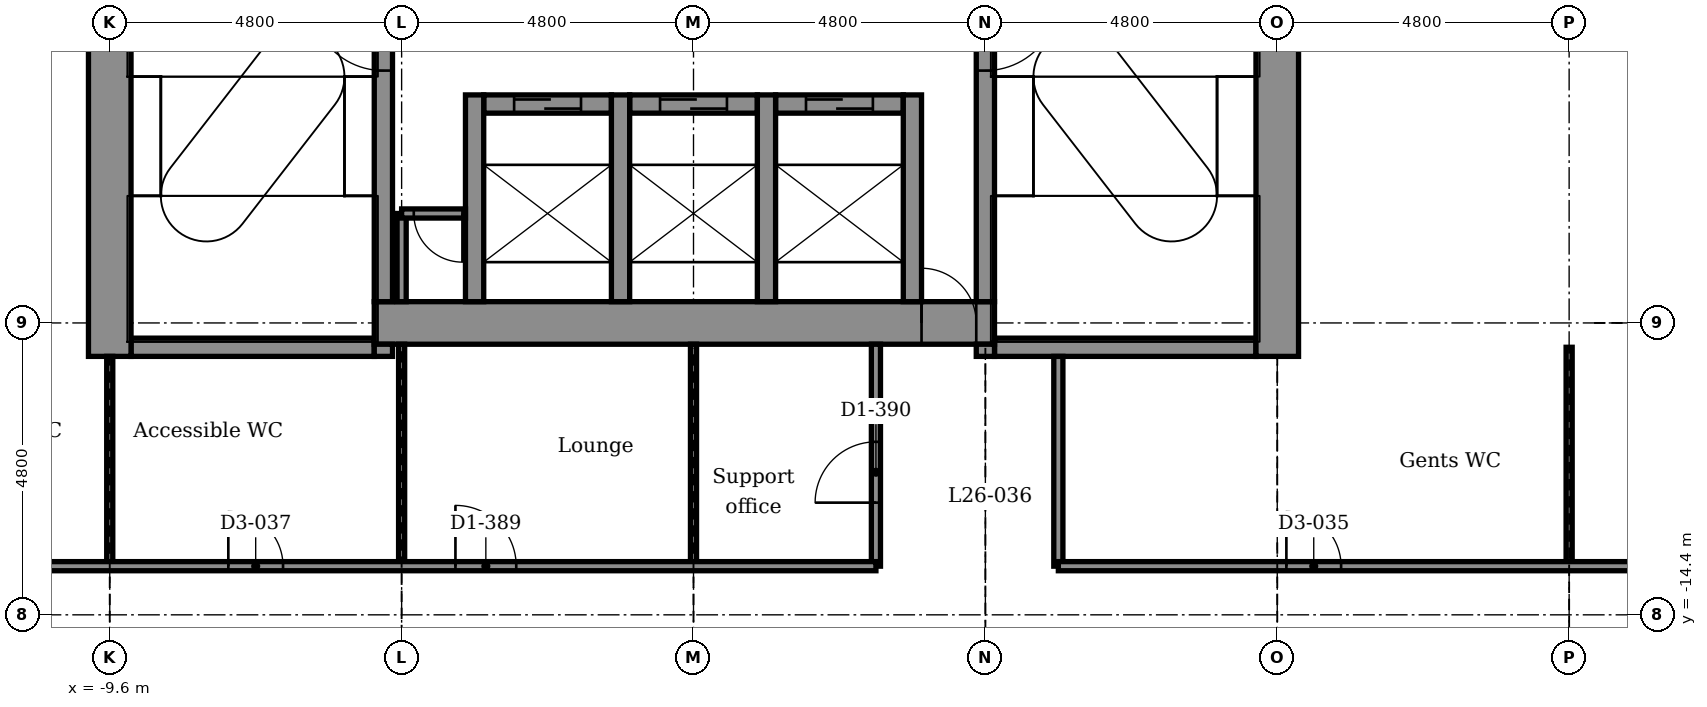
"""IFC4 building model, lengths in metres.
Left out: names, types, materials, properties, quantities, classifications, styles, units other than length and angle.
Written with IfcOpenShell. Run it as: python <this file> out.ifc"""

import sys

from ifc_helpers import new_model, si_unit, direction, frame, frame_2d, origin, place, context, subcontext, project, spatial, rectangle, extrude, element, fill, save


model = new_model("IFC4")
c1 = context("Model", 3, precision=1e-05, world=origin(), true_north=direction((0.0, 1.0)))
c2 = subcontext(c1, "Body", "Model", "MODEL_VIEW")
j1 = project(units=[si_unit("LENGTHUNIT", "METRE"), si_unit("PLANEANGLEUNIT", "RADIAN")], contexts=[c1])
p1 = place(None, origin())
s1 = spatial("IfcSite", under=j1, at=p1, CompositionType="ELEMENT")
p2 = place(p1, origin())
s2 = spatial("IfcBuilding", under=s1, at=p2, CompositionType="ELEMENT")
p3 = place(p2, frame((0.0, 0.0, 133.4)))
s3 = spatial("IfcBuildingStorey", under=s2, at=p3, CompositionType="ELEMENT", Elevation=133.4)
p4 = place(p3, frame((-9.25, -10.0, -0.15), z_axis=(0.0, 0.0, 1.0), x_axis=(1.0, 0.0, 0.0)))
e1 = element("IfcWall", 1, at=p4, inside=s3, PredefinedType="STANDARD", context=c2, shape_type="SweptSolid", body=[
    extrude(rectangle(XDim=4.0, YDim=0.3, at=frame_2d((2.0, 0.0))), origin(), (0.0, 0.0, 1.0), 5.4),
])
p5 = place(p3, frame((4.95, -10.0, -0.15), z_axis=(0.0, 0.0, 1.0), x_axis=(1.0, 0.0, 0.0)))
e2 = element("IfcWall", 2, at=p5, inside=s3, PredefinedType="STANDARD", context=c2, shape_type="SweptSolid", body=[
    extrude(rectangle(XDim=4.3, YDim=0.3, at=frame_2d((2.15, 0.0))), origin(), (0.0, 0.0, 1.0), 5.4),
])
p6 = place(p3, frame((-5.25, -9.6, -0.15), z_axis=(0.0, 0.0, 1.0), x_axis=(1.0, 0.0, 0.0)))
e3 = element("IfcWall", 3, at=p6, inside=s3, PredefinedType="SHEAR", context=c2, shape_type="SweptSolid", body=[
    extrude(rectangle(XDim=10.2, YDim=0.7, at=frame_2d((5.1, 0.0))), origin(), (0.0, 0.0, 1.0), 5.4),
])
p7 = place(p6, frame((9.0, 0.0, 0.15)))
e4 = element("IfcOpeningElement", 4, at=p7, cuts=e3, PredefinedType="OPENING", context=c2, shape_type="SweptSolid", body=[
    extrude(rectangle(XDim=0.9, YDim=2.1, at=frame_2d((0.45, 1.05))), frame((0.0, 0.36, 0.0), z_axis=(0.0, -1.0, 0.0), x_axis=(1.0, 0.0, 0.0)), (0.0, 0.0, 1.0), 0.72),
])
p8 = place(p3, frame((-3.45, -6.0, -0.15), z_axis=(0.0, 0.0, 1.0), x_axis=(1.0, 0.0, 0.0)))
e5 = element("IfcWall", 5, at=p8, inside=s3, PredefinedType="STANDARD", context=c2, shape_type="SweptSolid", body=[
    extrude(rectangle(XDim=2.1, YDim=0.3, at=frame_2d((1.05, 0.0))), origin(), (0.0, 0.0, 1.0), 5.4),
])
p9 = place(p8, frame((0.5, 0.0, 0.15)))
e6 = element("IfcOpeningElement", 6, at=p9, cuts=e5, PredefinedType="OPENING", context=c2, shape_type="SweptSolid", body=[
    extrude(rectangle(XDim=1.1, YDim=2.1, at=frame_2d((0.55, 1.05))), frame((0.0, 0.16, 0.0), z_axis=(0.0, -1.0, 0.0), x_axis=(1.0, 0.0, 0.0)), (0.0, 0.0, 1.0), 0.32),
])
p10 = place(p3, frame((-1.05, -6.0, -0.15), z_axis=(0.0, 0.0, 1.0), x_axis=(1.0, 0.0, 0.0)))
e7 = element("IfcWall", 7, at=p10, inside=s3, PredefinedType="STANDARD", context=c2, shape_type="SweptSolid", body=[
    extrude(rectangle(XDim=2.1, YDim=0.3, at=frame_2d((1.05, 0.0))), origin(), (0.0, 0.0, 1.0), 5.4),
])
p11 = place(p10, frame((0.5, 0.0, 0.15)))
e8 = element("IfcOpeningElement", 8, at=p11, cuts=e7, PredefinedType="OPENING", context=c2, shape_type="SweptSolid", body=[
    extrude(rectangle(XDim=1.1, YDim=2.1, at=frame_2d((0.55, 1.05))), frame((0.0, 0.16, 0.0), z_axis=(0.0, -1.0, 0.0), x_axis=(1.0, 0.0, 0.0)), (0.0, 0.0, 1.0), 0.32),
])
p12 = place(p3, frame((1.35, -6.0, -0.15), z_axis=(0.0, 0.0, 1.0), x_axis=(1.0, 0.0, 0.0)))
e9 = element("IfcWall", 9, at=p12, inside=s3, PredefinedType="STANDARD", context=c2, shape_type="SweptSolid", body=[
    extrude(rectangle(XDim=2.1, YDim=0.3, at=frame_2d((1.05, 0.0))), origin(), (0.0, 0.0, 1.0), 5.4),
])
p13 = place(p12, frame((0.5, 0.0, 0.15)))
e10 = element("IfcOpeningElement", 10, at=p13, cuts=e9, PredefinedType="OPENING", context=c2, shape_type="SweptSolid", body=[
    extrude(rectangle(XDim=1.1, YDim=2.1, at=frame_2d((0.55, 1.05))), frame((0.0, 0.16, 0.0), z_axis=(0.0, -1.0, 0.0), x_axis=(1.0, 0.0, 0.0)), (0.0, 0.0, 1.0), 0.32),
])
p14 = place(p3, frame((-9.6, -10.15, -0.15), z_axis=(0.0, 0.0, 1.0), x_axis=(0.0, 1.0, 0.0)))
e11 = element("IfcWall", 11, at=p14, inside=s3, PredefinedType="SHEAR", context=c2, shape_type="SweptSolid", body=[
    extrude(rectangle(XDim=7.6, YDim=0.7, at=frame_2d((3.8, 0.0))), origin(), (0.0, 0.0, 1.0), 5.4),
])
p15 = place(p3, frame((-5.1, -10.15, -0.15), z_axis=(0.0, 0.0, 1.0), x_axis=(0.0, 1.0, 0.0)))
e12 = element("IfcWall", 12, at=p15, inside=s3, PredefinedType="STANDARD", context=c2, shape_type="SweptSolid", body=[
    extrude(rectangle(XDim=0.2, YDim=0.3, at=frame_2d((0.1, 0.0))), origin(), (0.0, 0.0, 1.0), 5.4),
])
p16 = place(p3, frame((-5.1, -9.25, -0.15), z_axis=(0.0, 0.0, 1.0), x_axis=(0.0, 1.0, 0.0)))
e13 = element("IfcWall", 13, at=p16, inside=s3, PredefinedType="STANDARD", context=c2, shape_type="SweptSolid", body=[
    extrude(rectangle(XDim=7.0, YDim=0.3, at=frame_2d((3.5, 0.0))), origin(), (0.0, 0.0, 1.0), 5.4),
])
p17 = place(p16, frame((3.8, 0.0, 0.15)))
e14 = element("IfcOpeningElement", 14, at=p17, cuts=e13, PredefinedType="OPENING", context=c2, shape_type="SweptSolid", body=[
    extrude(rectangle(XDim=1.2, YDim=2.1, at=frame_2d((0.6, 1.05))), frame((0.0, 0.16, 0.0), z_axis=(0.0, -1.0, 0.0), x_axis=(1.0, 0.0, 0.0)), (0.0, 0.0, 1.0), 0.32),
])
for number, where, z_axis, x_axis in (
    (15, (-3.6, -9.25, -0.15), (0.0, 0.0, 1.0), (0.0, 1.0, 0.0)),
    (16, (-1.2, -9.25, -0.15), (0.0, 0.0, 1.0), (0.0, 1.0, 0.0)),
    (17, (1.2, -9.25, -0.15), (0.0, 0.0, 1.0), (0.0, 1.0, 0.0)),
    (18, (3.6, -9.25, -0.15), (0.0, 0.0, 1.0), (0.0, 1.0, 0.0)),
):
    element("IfcWall", number, at=place(p3, frame(where, z_axis=z_axis, x_axis=x_axis)), inside=s3, PredefinedType="STANDARD", context=c2, shape_type="SweptSolid", body=[
        extrude(rectangle(XDim=3.4, YDim=0.3, at=frame_2d((1.7, 0.0))), origin(), (0.0, 0.0, 1.0), 5.4),
    ])
p18 = place(p3, frame((4.8, -10.15, -0.15), z_axis=(0.0, 0.0, 1.0), x_axis=(0.0, 1.0, 0.0)))
e19 = element("IfcWall", 19, at=p18, inside=s3, PredefinedType="STANDARD", context=c2, shape_type="SweptSolid", body=[
    extrude(rectangle(XDim=0.2, YDim=0.3, at=frame_2d((0.1, 0.0))), origin(), (0.0, 0.0, 1.0), 5.4),
])
p19 = place(p3, frame((4.8, -9.25, -0.15), z_axis=(0.0, 0.0, 1.0), x_axis=(0.0, 1.0, 0.0)))
e20 = element("IfcWall", 20, at=p19, inside=s3, PredefinedType="STANDARD", context=c2, shape_type="SweptSolid", body=[
    extrude(rectangle(XDim=7.0, YDim=0.3, at=frame_2d((3.5, 0.0))), origin(), (0.0, 0.0, 1.0), 5.4),
])
p20 = place(p19, frame((3.8, 0.0, 0.15)))
e21 = element("IfcOpeningElement", 21, at=p20, cuts=e20, PredefinedType="OPENING", context=c2, shape_type="SweptSolid", body=[
    extrude(rectangle(XDim=1.2, YDim=2.1, at=frame_2d((0.6, 1.05))), frame((0.0, 0.16, 0.0), z_axis=(0.0, -1.0, 0.0), x_axis=(1.0, 0.0, 0.0)), (0.0, 0.0, 1.0), 0.32),
])
p21 = place(p3, frame((9.6, -10.15, -0.15), z_axis=(0.0, 0.0, 1.0), x_axis=(0.0, 1.0, 0.0)))
e22 = element("IfcWall", 22, at=p21, inside=s3, PredefinedType="SHEAR", context=c2, shape_type="SweptSolid", body=[
    extrude(rectangle(XDim=20.1, YDim=0.7, at=frame_2d((10.05, 0.0))), origin(), (0.0, 0.0, 1.0), 5.4),
])
p22 = place(p3, frame((14.4, -13.6, 0.0), z_axis=(0.0, 0.0, 1.0), x_axis=(0.0, 1.0, 0.0)))
e23 = element("IfcWall", 23, at=p22, inside=s3, PredefinedType="PARTITIONING", context=c2, shape_type="SweptSolid", body=[
    extrude(rectangle(XDim=3.6, YDim=0.1, at=frame_2d((1.8, 0.0))), origin(), (0.0, 0.0, 1.0), 4.566),
])
p23 = place(p3, frame((6.0, -13.6, 0.0), z_axis=(0.0, 0.0, 1.0), x_axis=(0.0, 1.0, 0.0)))
e24 = element("IfcWall", 24, at=p23, inside=s3, PredefinedType="PARTITIONING", context=c2, shape_type="SweptSolid", body=[
    extrude(rectangle(XDim=3.45, YDim=0.15, at=frame_2d((1.725, 0.0))), origin(), (0.0, 0.0, 1.0), 5.25),
])
p24 = place(p3, frame((3.0, -13.6, 0.0), z_axis=(0.0, 0.0, 1.0), x_axis=(0.0, 1.0, 0.0)))
e25 = element("IfcWall", 25, at=p24, inside=s3, PredefinedType="PARTITIONING", context=c2, shape_type="SweptSolid", body=[
    extrude(rectangle(XDim=3.65, YDim=0.15, at=frame_2d((1.825, 0.0))), origin(), (0.0, 0.0, 1.0), 5.25),
])
p25 = place(p24, frame((1.045, 0.0, 0.0)))
e26 = element("IfcOpeningElement", 26, at=p25, cuts=e25, PredefinedType="OPENING", context=c2, shape_type="SweptSolid", body=[
    extrude(rectangle(XDim=1.0, YDim=2.1, at=frame_2d((0.5, 1.05))), frame((0.0, 0.085, 0.0), z_axis=(0.0, -1.0, 0.0), x_axis=(1.0, 0.0, 0.0)), (0.0, 0.0, 1.0), 0.17),
])
for number, where, z_axis, x_axis in (
    (27, (0.0, -13.6, 0.0), (0.0, 0.0, 1.0), (0.0, 1.0, 0.0)),
    (28, (-4.8, -13.6, 0.0), (0.0, 0.0, 1.0), (0.0, 1.0, 0.0)),
):
    element("IfcWall", number, at=place(p3, frame(where, z_axis=z_axis, x_axis=x_axis)), inside=s3, PredefinedType="PARTITIONING", context=c2, shape_type="SweptSolid", body=[
        extrude(rectangle(XDim=3.65, YDim=0.1, at=frame_2d((1.825, 0.0))), origin(), (0.0, 0.0, 1.0), 4.566),
    ])
p26 = place(p3, frame((-4.8, -9.25, 0.0), z_axis=(0.0, 0.0, 1.0), x_axis=(0.0, 1.0, 0.0)))
e29 = element("IfcWall", 29, at=p26, inside=s3, PredefinedType="PARTITIONING", context=c2, shape_type="SweptSolid", body=[
    extrude(rectangle(XDim=1.45, YDim=0.15, at=frame_2d((0.725, 0.0))), origin(), (0.0, 0.0, 1.0), 5.25),
])
p27 = place(p3, frame((-9.6, -13.6, 0.0), z_axis=(0.0, 0.0, 1.0), x_axis=(0.0, 1.0, 0.0)))
e30 = element("IfcWall", 30, at=p27, inside=s3, PredefinedType="PARTITIONING", context=c2, shape_type="SweptSolid", body=[
    extrude(rectangle(XDim=3.45, YDim=0.1, at=frame_2d((1.725, 0.0))), origin(), (0.0, 0.0, 1.0), 4.566),
])
p28 = place(p3, frame((-17.276, -13.6, 0.0), z_axis=(0.0, 0.0, 1.0), x_axis=(1.0, 0.0, 0.0)))
e31 = element("IfcWall", 31, at=p28, inside=s3, PredefinedType="PARTITIONING", context=c2, shape_type="SweptSolid", body=[
    extrude(rectangle(XDim=20.276, YDim=0.15, at=frame_2d((10.138, 0.0))), origin(), (0.0, 0.0, 1.0), 5.25),
])
p29 = place(p28, frame((4.826, 0.0, 0.0)))
e32 = element("IfcOpeningElement", 32, at=p29, cuts=e31, PredefinedType="OPENING", context=c2, shape_type="SweptSolid", body=[
    extrude(rectangle(XDim=0.9, YDim=2.1, at=frame_2d((0.45, 1.05))), frame((0.0, 0.085, 0.0), z_axis=(0.0, -1.0, 0.0), x_axis=(1.0, 0.0, 0.0)), (0.0, 0.0, 1.0), 0.17),
])
p30 = place(p28, frame((9.626, 0.0, 0.0)))
e33 = element("IfcOpeningElement", 33, at=p30, cuts=e31, PredefinedType="OPENING", context=c2, shape_type="SweptSolid", body=[
    extrude(rectangle(XDim=0.9, YDim=2.1, at=frame_2d((0.45, 1.05))), frame((0.0, 0.085, 0.0), z_axis=(0.0, -1.0, 0.0), x_axis=(1.0, 0.0, 0.0)), (0.0, 0.0, 1.0), 0.17),
])
p31 = place(p28, frame((13.361, 0.0, 0.0)))
e34 = element("IfcOpeningElement", 34, at=p31, cuts=e31, PredefinedType="OPENING", context=c2, shape_type="SweptSolid", body=[
    extrude(rectangle(XDim=1.0, YDim=2.1, at=frame_2d((0.5, 1.05))), frame((0.0, 0.085, 0.0), z_axis=(0.0, -1.0, 0.0), x_axis=(1.0, 0.0, 0.0)), (0.0, 0.0, 1.0), 0.17),
])
p32 = place(p3, frame((6.0, -13.6, 0.0), z_axis=(0.0, 0.0, 1.0), x_axis=(1.0, 0.0, 0.0)))
e35 = element("IfcWall", 35, at=p32, inside=s3, PredefinedType="PARTITIONING", context=c2, shape_type="SweptSolid", body=[
    extrude(rectangle(XDim=13.077, YDim=0.15, at=frame_2d((6.539, 0.0))), origin(), (0.0, 0.0, 1.0), 5.25),
])
p33 = place(p32, frame((3.75, 0.0, 0.0)))
e36 = element("IfcOpeningElement", 36, at=p33, cuts=e35, PredefinedType="OPENING", context=c2, shape_type="SweptSolid", body=[
    extrude(rectangle(XDim=0.9, YDim=2.1, at=frame_2d((0.45, 1.05))), frame((0.0, 0.085, 0.0), z_axis=(0.0, -1.0, 0.0), x_axis=(1.0, 0.0, 0.0)), (0.0, 0.0, 1.0), 0.17),
])
p34 = place(p3, frame((-4.8, -7.8, 0.0), z_axis=(0.0, 0.0, 1.0), x_axis=(1.0, 0.0, 0.0)))
e37 = element("IfcWall", 37, at=p34, inside=s3, PredefinedType="PARTITIONING", context=c2, shape_type="SweptSolid", body=[
    extrude(rectangle(XDim=1.05, YDim=0.15, at=frame_2d((0.525, 0.0))), origin(), (0.0, 0.0, 1.0), 5.25),
])
p35 = place(p34, frame((0.2, 0.0, 0.0)))
e38 = element("IfcOpeningElement", 38, at=p35, cuts=e37, PredefinedType="OPENING", context=c2, shape_type="SweptSolid", body=[
    extrude(rectangle(XDim=0.8, YDim=2.1, at=frame_2d((0.4, 1.05))), frame((0.0, 0.085, 0.0), z_axis=(0.0, -1.0, 0.0), x_axis=(1.0, 0.0, 0.0)), (0.0, 0.0, 1.0), 0.17),
])
p36 = place(p35, frame((0.8, 0.0, 0.0), z_axis=(0.0, 0.0, 1.0), x_axis=(-1.0, 0.0, 0.0)))
e39 = element("IfcDoor", 39, at=p36, inside=s3, OperationType="SINGLE_SWING_RIGHT", PredefinedType="DOOR", context=c2, shape_type="SweptSolid", body=[
    extrude(rectangle(XDim=0.8, YDim=2.1, at=frame_2d((0.4, 1.05))), frame((0.0, 0.025, 0.0), z_axis=(0.0, -1.0, 0.0), x_axis=(1.0, 0.0, 0.0)), (0.0, 0.0, 1.0), 0.05),
])
fill(e38, e39)
p37 = place(p33, origin())
e40 = element("IfcDoor", 40, at=p37, inside=s3, OperationType="SINGLE_SWING_LEFT", PredefinedType="DOOR", context=c2, shape_type="SweptSolid", body=[
    extrude(rectangle(XDim=0.9, YDim=2.1, at=frame_2d((0.45, 1.05))), frame((0.0, 0.025, 0.0), z_axis=(0.0, -1.0, 0.0), x_axis=(1.0, 0.0, 0.0)), (0.0, 0.0, 1.0), 0.05),
])
fill(e36, e40)
p38 = place(p30, origin())
e41 = element("IfcDoor", 41, at=p38, inside=s3, OperationType="SINGLE_SWING_LEFT", PredefinedType="DOOR", context=c2, shape_type="SweptSolid", body=[
    extrude(rectangle(XDim=0.9, YDim=2.1, at=frame_2d((0.45, 1.05))), frame((0.0, 0.025, 0.0), z_axis=(0.0, -1.0, 0.0), x_axis=(1.0, 0.0, 0.0)), (0.0, 0.0, 1.0), 0.05),
])
fill(e33, e41)
p39 = place(p31, origin())
e42 = element("IfcDoor", 42, at=p39, inside=s3, OperationType="SINGLE_SWING_LEFT", PredefinedType="DOOR", context=c2, shape_type="SweptSolid", body=[
    extrude(rectangle(XDim=1.0, YDim=2.1, at=frame_2d((0.5, 1.05))), frame((0.0, 0.025, 0.0), z_axis=(0.0, -1.0, 0.0), x_axis=(1.0, 0.0, 0.0)), (0.0, 0.0, 1.0), 0.05),
])
fill(e34, e42)
p40 = place(p25, origin())
e43 = element("IfcDoor", 43, at=p40, inside=s3, OperationType="SINGLE_SWING_LEFT", PredefinedType="DOOR", context=c2, shape_type="SweptSolid", body=[
    extrude(rectangle(XDim=1.0, YDim=2.1, at=frame_2d((0.5, 1.05))), frame((0.0, 0.025, 0.0), z_axis=(0.0, -1.0, 0.0), x_axis=(1.0, 0.0, 0.0)), (0.0, 0.0, 1.0), 0.05),
])
fill(e26, e43)
p41 = place(p9, origin())
e44 = element("IfcDoor", 44, at=p41, inside=s3, OperationType="DOUBLE_DOOR_SLIDING", PredefinedType="DOOR", context=c2, shape_type="SweptSolid", body=[
    extrude(rectangle(XDim=1.1, YDim=2.1, at=frame_2d((0.55, 1.05))), frame((0.0, 0.025, 0.0), z_axis=(0.0, -1.0, 0.0), x_axis=(1.0, 0.0, 0.0)), (0.0, 0.0, 1.0), 0.05),
])
fill(e6, e44)
p42 = place(p11, origin())
e45 = element("IfcDoor", 45, at=p42, inside=s3, OperationType="DOUBLE_DOOR_SLIDING", PredefinedType="DOOR", context=c2, shape_type="SweptSolid", body=[
    extrude(rectangle(XDim=1.1, YDim=2.1, at=frame_2d((0.55, 1.05))), frame((0.0, 0.025, 0.0), z_axis=(0.0, -1.0, 0.0), x_axis=(1.0, 0.0, 0.0)), (0.0, 0.0, 1.0), 0.05),
])
fill(e8, e45)
p43 = place(p13, origin())
e46 = element("IfcDoor", 46, at=p43, inside=s3, OperationType="DOUBLE_DOOR_SLIDING", PredefinedType="DOOR", context=c2, shape_type="SweptSolid", body=[
    extrude(rectangle(XDim=1.1, YDim=2.1, at=frame_2d((0.55, 1.05))), frame((0.0, 0.025, 0.0), z_axis=(0.0, -1.0, 0.0), x_axis=(1.0, 0.0, 0.0)), (0.0, 0.0, 1.0), 0.05),
])
fill(e10, e46)
p44 = place(p17, origin())
e47 = element("IfcDoor", 47, at=p44, inside=s3, OperationType="SINGLE_SWING_RIGHT", PredefinedType="DOOR", context=c2, shape_type="SweptSolid", body=[
    extrude(rectangle(XDim=1.2, YDim=2.1, at=frame_2d((0.6, 1.05))), frame((0.0, 0.025, 0.0), z_axis=(0.0, -1.0, 0.0), x_axis=(1.0, 0.0, 0.0)), (0.0, 0.0, 1.0), 0.05),
])
fill(e14, e47)
p45 = place(p20, frame((1.2, 0.0, 0.0), z_axis=(0.0, 0.0, 1.0), x_axis=(-1.0, 0.0, 0.0)))
e48 = element("IfcDoor", 48, at=p45, inside=s3, OperationType="SINGLE_SWING_RIGHT", PredefinedType="DOOR", context=c2, shape_type="SweptSolid", body=[
    extrude(rectangle(XDim=1.2, YDim=2.1, at=frame_2d((0.6, 1.05))), frame((0.0, 0.025, 0.0), z_axis=(0.0, -1.0, 0.0), x_axis=(1.0, 0.0, 0.0)), (0.0, 0.0, 1.0), 0.05),
])
fill(e21, e48)
p46 = place(p7, origin())
e49 = element("IfcDoor", 49, at=p46, inside=s3, OperationType="SINGLE_SWING_LEFT", PredefinedType="DOOR", context=c2, shape_type="SweptSolid", body=[
    extrude(rectangle(XDim=0.9, YDim=2.1, at=frame_2d((0.45, 1.05))), frame((0.0, 0.025, 0.0), z_axis=(0.0, -1.0, 0.0), x_axis=(1.0, 0.0, 0.0)), (0.0, 0.0, 1.0), 0.05),
])
fill(e4, e49)
save(model, sys.argv[1])
